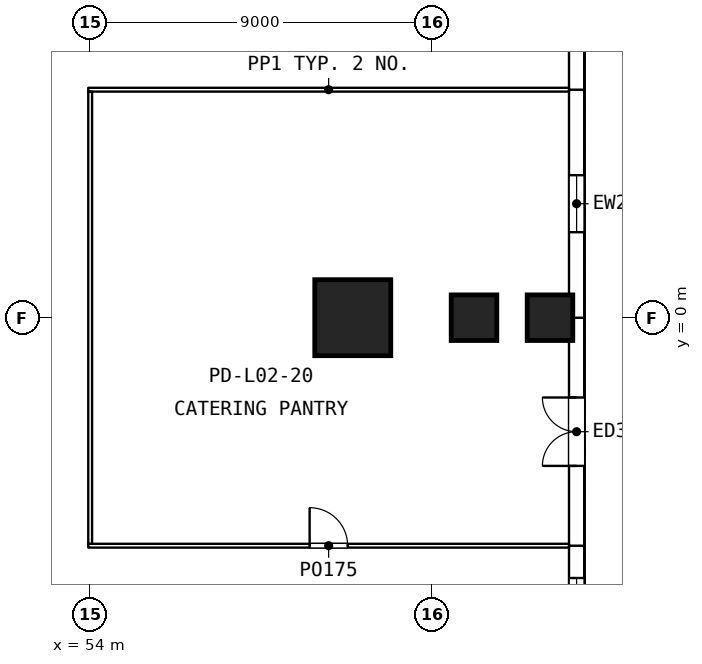
"""IFC4 building model, lengths in metres.
Left out: names, types, materials, properties, quantities, classifications, styles, units other than length and angle.
Written with IfcOpenShell. Run it as: python <this file> out.ifc"""

import sys

from ifc_helpers import new_model, si_unit, direction, frame, frame_2d, origin, origin_2d, place, context, subcontext, project, spatial, rectangle, extrude, element, fill, save


model = new_model("IFC4")
c1 = context("Model", 3, precision=1e-05, world=origin(), true_north=direction((0.0, 1.0)))
c2 = subcontext(c1, "Body", "Model", "MODEL_VIEW")
j1 = project(units=[si_unit("LENGTHUNIT", "METRE"), si_unit("PLANEANGLEUNIT", "RADIAN")], contexts=[c1])
p1 = place(None, origin())
s1 = spatial("IfcSite", under=j1, at=p1, CompositionType="ELEMENT")
p2 = place(p1, origin())
s2 = spatial("IfcBuilding", under=s1, at=p2, CompositionType="ELEMENT")
p3 = place(p2, frame((0.0, 0.0, 12.6)))
s3 = spatial("IfcBuildingStorey", under=s2, at=p3, CompositionType="ELEMENT", Elevation=12.6)
for number, where, z_axis, x_axis in (
    (1, (64.1, 0.0, 0.0), (0.0, 0.0, 1.0), (1.0, 0.0, 0.0)),
    (2, (66.1, 0.0, 0.0), (0.0, 0.0, 1.0), (1.0, 0.0, 0.0)),
):
    element("IfcColumn", number, at=place(p3, frame(where, z_axis=z_axis, x_axis=x_axis)), inside=s3, PredefinedType="COLUMN", context=c2, shape_type="SweptSolid", body=[
        extrude(rectangle(XDim=1.2, YDim=1.2, at=origin_2d()), origin(), (0.0, 0.0, 1.0), 5.4),
    ])
p4 = place(p3, frame((60.91, 0.0, 0.0), z_axis=(0.0, 0.0, 1.0), x_axis=(1.0, 0.0, 0.0)))
e3 = element("IfcColumn", 3, at=p4, inside=s3, PredefinedType="COLUMN", context=c2, shape_type="SweptSolid", body=[
    extrude(rectangle(XDim=2.0, YDim=2.0, at=origin_2d()), origin(), (0.0, 0.0, 1.0), 5.4),
])
p5 = place(p3, frame((66.8, -12.0, 0.0), z_axis=(0.0, 0.0, 1.0), x_axis=(0.0, 1.0, 0.0)))
e4 = element("IfcWall", 4, at=p5, inside=s3, PredefinedType="SOLIDWALL", context=c2, shape_type="SweptSolid", body=[
    extrude(rectangle(XDim=6.0, YDim=0.4, at=frame_2d((3.0, 0.0))), origin(), (0.0, 0.0, 1.0), 5.1),
])
p6 = place(p5, frame((3.65, 0.0, 1.0)))
e5 = element("IfcOpeningElement", 5, at=p6, cuts=e4, PredefinedType="OPENING", context=c2, shape_type="SweptSolid", body=[
    extrude(rectangle(XDim=1.5, YDim=2.4, at=frame_2d((0.75, 1.2))), frame((0.0, 0.21, 0.0), z_axis=(0.0, -1.0, 0.0), x_axis=(1.0, 0.0, 0.0)), (0.0, 0.0, 1.0), 0.42),
])
p7 = place(p3, frame((66.8, -6.0, 0.0), z_axis=(0.0, 0.0, 1.0), x_axis=(0.0, 1.0, 0.0)))
e6 = element("IfcWall", 6, at=p7, inside=s3, PredefinedType="SOLIDWALL", context=c2, shape_type="SweptSolid", body=[
    extrude(rectangle(XDim=6.0, YDim=0.4, at=frame_2d((3.0, 0.0))), origin(), (0.0, 0.0, 1.0), 5.1),
])
p8 = place(p7, frame((2.1, 0.0, 0.0)))
e7 = element("IfcOpeningElement", 7, at=p8, cuts=e6, PredefinedType="OPENING", context=c2, shape_type="SweptSolid", body=[
    extrude(rectangle(XDim=1.8, YDim=2.4, at=frame_2d((0.9, 1.2))), frame((0.0, 0.21, 0.0), z_axis=(0.0, -1.0, 0.0), x_axis=(1.0, 0.0, 0.0)), (0.0, 0.0, 1.0), 0.42),
])
p9 = place(p3, frame((66.8, 0.0, 0.0), z_axis=(0.0, 0.0, 1.0), x_axis=(0.0, 1.0, 0.0)))
e8 = element("IfcWall", 8, at=p9, inside=s3, PredefinedType="SOLIDWALL", context=c2, shape_type="SweptSolid", body=[
    extrude(rectangle(XDim=6.0, YDim=0.4, at=frame_2d((3.0, 0.0))), origin(), (0.0, 0.0, 1.0), 5.1),
])
p10 = place(p9, frame((2.25, 0.0, 1.0)))
e9 = element("IfcOpeningElement", 9, at=p10, cuts=e8, PredefinedType="OPENING", context=c2, shape_type="SweptSolid", body=[
    extrude(rectangle(XDim=1.5, YDim=2.4, at=frame_2d((0.75, 1.2))), frame((0.0, 0.21, 0.0), z_axis=(0.0, -1.0, 0.0), x_axis=(1.0, 0.0, 0.0)), (0.0, 0.0, 1.0), 0.42),
])
p11 = place(p3, frame((66.8, 6.0, 0.0), z_axis=(0.0, 0.0, 1.0), x_axis=(0.0, 1.0, 0.0)))
e10 = element("IfcWall", 10, at=p11, inside=s3, PredefinedType="SOLIDWALL", context=c2, shape_type="SweptSolid", body=[
    extrude(rectangle(XDim=6.0, YDim=0.4, at=frame_2d((3.0, 0.0))), origin(), (0.0, 0.0, 1.0), 5.1),
])
p12 = place(p11, frame((3.65, 0.0, 1.0)))
e11 = element("IfcOpeningElement", 11, at=p12, cuts=e10, PredefinedType="OPENING", context=c2, shape_type="SweptSolid", body=[
    extrude(rectangle(XDim=1.5, YDim=2.4, at=frame_2d((0.75, 1.2))), frame((0.0, 0.21, 0.0), z_axis=(0.0, -1.0, 0.0), x_axis=(1.0, 0.0, 0.0)), (0.0, 0.0, 1.0), 0.42),
])
p13 = place(p3, frame((53.95, -6.0, 0.0), z_axis=(0.0, 0.0, 1.0), x_axis=(1.0, 0.0, 0.0)))
e12 = element("IfcWall", 12, at=p13, inside=s3, PredefinedType="PARTITIONING", context=c2, shape_type="SweptSolid", body=[
    extrude(rectangle(XDim=12.65, YDim=0.1, at=frame_2d((6.325, 0.0))), origin(), (0.0, 0.0, 1.0), 5.1),
])
p14 = place(p13, frame((5.825, 0.0, 0.0)))
e13 = element("IfcOpeningElement", 13, at=p14, cuts=e12, PredefinedType="OPENING", context=c2, shape_type="SweptSolid", body=[
    extrude(rectangle(XDim=1.0, YDim=2.1, at=frame_2d((0.5, 1.05))), frame((0.0, 0.06, 0.0), z_axis=(0.0, -1.0, 0.0), x_axis=(1.0, 0.0, 0.0)), (0.0, 0.0, 1.0), 0.12),
])
p15 = place(p3, frame((53.95, 6.0, 0.0), z_axis=(0.0, 0.0, 1.0), x_axis=(1.0, 0.0, 0.0)))
e14 = element("IfcWall", 14, at=p15, inside=s3, PredefinedType="PARTITIONING", context=c2, shape_type="SweptSolid", body=[
    extrude(rectangle(XDim=12.65, YDim=0.1, at=frame_2d((6.325, 0.0))), origin(), (0.0, 0.0, 1.0), 5.1),
])
p16 = place(p3, frame((54.0, -5.95, 0.0), z_axis=(0.0, 0.0, 1.0), x_axis=(0.0, 1.0, 0.0)))
e15 = element("IfcWall", 15, at=p16, inside=s3, PredefinedType="PARTITIONING", context=c2, shape_type="SweptSolid", body=[
    extrude(rectangle(XDim=11.9, YDim=0.1, at=frame_2d((5.95, 0.0))), origin(), (0.0, 0.0, 1.0), 5.1),
])
p17 = place(p6, origin())
e16 = element("IfcWindow", 16, at=p17, inside=s3, PartitioningType="SINGLE_PANEL", PredefinedType="WINDOW", context=c2, shape_type="SweptSolid", body=[
    extrude(rectangle(XDim=1.5, YDim=2.4, at=frame_2d((0.75, 1.2))), frame((0.0, 0.03, 0.0), z_axis=(0.0, -1.0, 0.0), x_axis=(1.0, 0.0, 0.0)), (0.0, 0.0, 1.0), 0.06),
])
fill(e5, e16)
p18 = place(p8, origin())
e17 = element("IfcDoor", 17, at=p18, inside=s3, OperationType="SINGLE_SWING_LEFT", PredefinedType="DOOR", context=c2, shape_type="SweptSolid", body=[
    extrude(rectangle(XDim=1.8, YDim=2.4, at=frame_2d((0.9, 1.2))), frame((0.0, 0.025, 0.0), z_axis=(0.0, -1.0, 0.0), x_axis=(1.0, 0.0, 0.0)), (0.0, 0.0, 1.0), 0.05),
])
fill(e7, e17)
p19 = place(p10, origin())
e18 = element("IfcWindow", 18, at=p19, inside=s3, PartitioningType="SINGLE_PANEL", PredefinedType="WINDOW", context=c2, shape_type="SweptSolid", body=[
    extrude(rectangle(XDim=1.5, YDim=2.4, at=frame_2d((0.75, 1.2))), frame((0.0, 0.03, 0.0), z_axis=(0.0, -1.0, 0.0), x_axis=(1.0, 0.0, 0.0)), (0.0, 0.0, 1.0), 0.06),
])
fill(e9, e18)
p20 = place(p14, origin())
e19 = element("IfcDoor", 19, at=p20, inside=s3, OperationType="SINGLE_SWING_LEFT", PredefinedType="DOOR", context=c2, shape_type="SweptSolid", body=[
    extrude(rectangle(XDim=1.0, YDim=2.1, at=frame_2d((0.5, 1.05))), frame((0.0, 0.025, 0.0), z_axis=(0.0, -1.0, 0.0), x_axis=(1.0, 0.0, 0.0)), (0.0, 0.0, 1.0), 0.05),
])
fill(e13, e19)
save(model, sys.argv[1])
